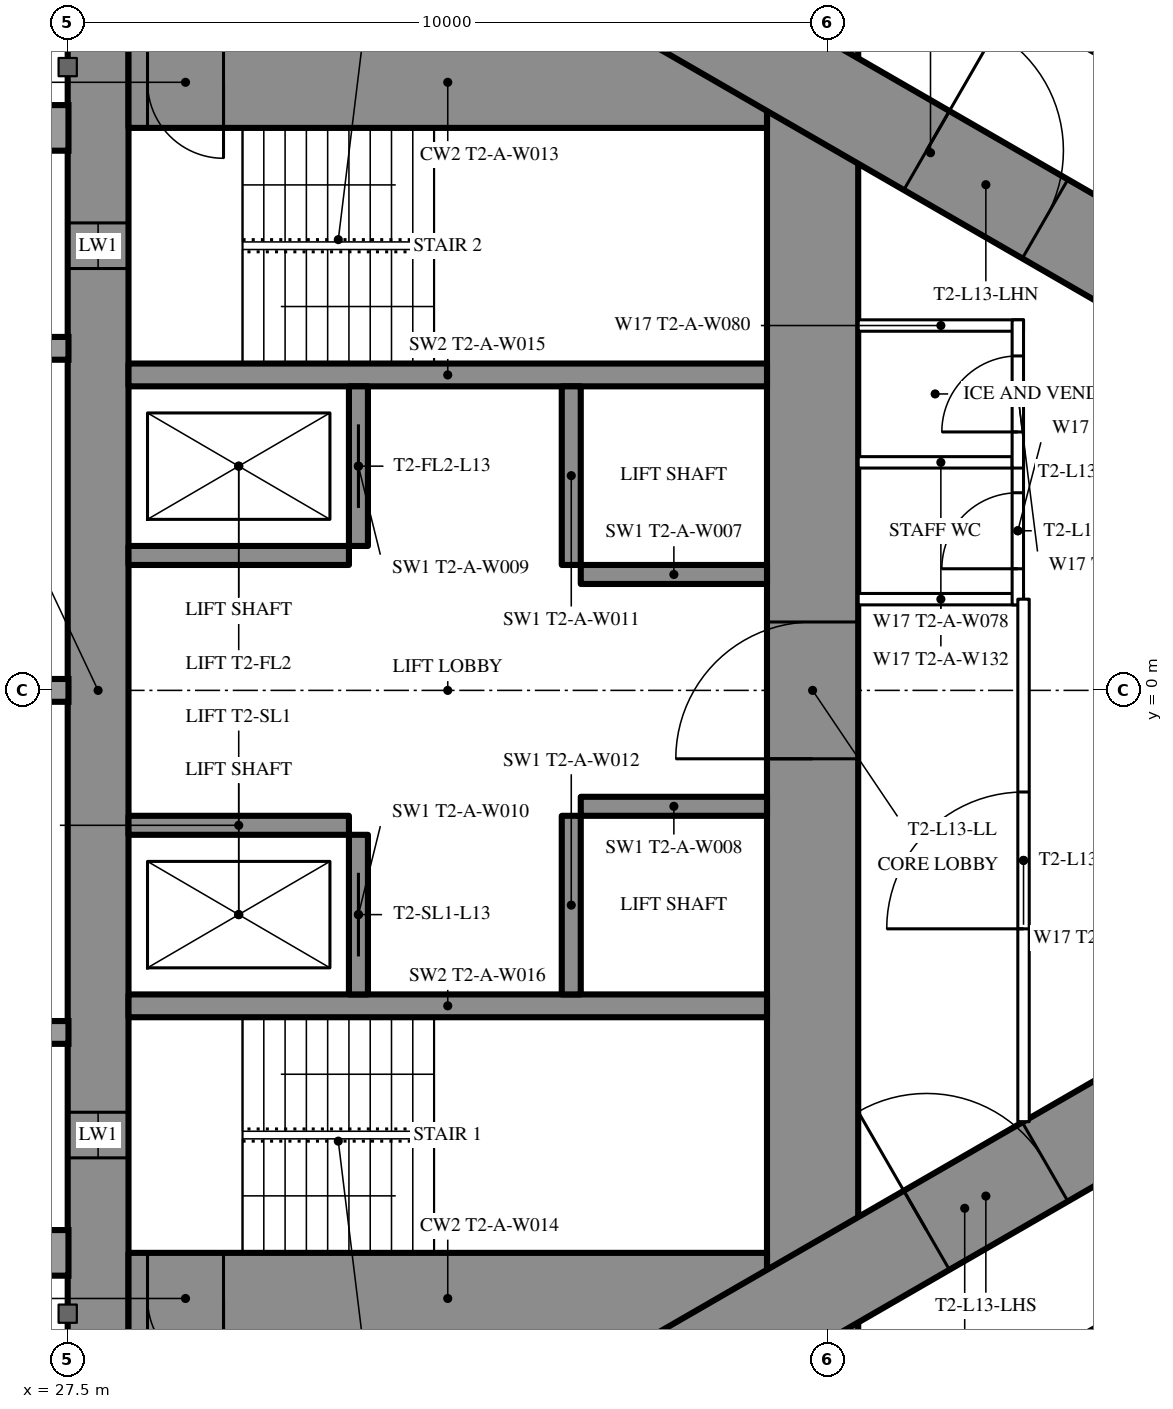
"""IFC4 building model, lengths in metres.
Left out: names, types, materials, properties, quantities, classifications, styles, units other than length and angle.
Written with IfcOpenShell. Run it as: python <this file> out.ifc"""

import sys

from ifc_helpers import new_model, si_unit, direction, frame, frame_2d, origin, place, context, subcontext, project, spatial, rectangle, extrude, element, fill, save


model = new_model("IFC4")
c1 = context("Model", 3, precision=1e-05, world=origin(), true_north=direction((0.0, 1.0)))
c2 = subcontext(c1, "Body", "Model", "MODEL_VIEW")
j1 = project(units=[si_unit("LENGTHUNIT", "METRE"), si_unit("PLANEANGLEUNIT", "RADIAN")], contexts=[c1])
p1 = place(None, origin())
s1 = spatial("IfcSite", under=j1, at=p1, CompositionType="ELEMENT")
p2 = place(p1, origin())
s2 = spatial("IfcBuilding", under=s1, at=p2, CompositionType="ELEMENT")
p3 = place(p2, frame((0.0, 0.0, 53.0)))
s3 = spatial("IfcBuildingStorey", under=s2, at=p3, CompositionType="ELEMENT", Elevation=53.0)
p4 = place(p3, frame((27.9, -8.6, 0.0), z_axis=(0.0, 0.0, 1.0), x_axis=(0.0, 1.0, 0.0)))
e1 = element("IfcWall", 1, at=p4, inside=s3, PredefinedType="SHEAR", context=c2, shape_type="SweptSolid", body=[
    extrude(rectangle(XDim=17.2, YDim=0.8, at=frame_2d((8.6, 0.0))), origin(), (0.0, 0.0, 1.0), 3.5),
])
p5 = place(p4, frame((2.45, 0.0, 0.6)))
e2 = element("IfcOpeningElement", 2, at=p5, cuts=e1, PredefinedType="OPENING", context=c2, shape_type="SweptSolid", body=[
    extrude(rectangle(XDim=0.6, YDim=2.1, at=frame_2d((0.3, 1.05))), frame((0.0, 0.41, 0.0), z_axis=(0.0, -1.0, 0.0), x_axis=(1.0, 0.0, 0.0)), (0.0, 0.0, 1.0), 0.82),
])
p6 = place(p4, frame((14.15, 0.0, 0.6)))
e3 = element("IfcOpeningElement", 3, at=p6, cuts=e1, PredefinedType="OPENING", context=c2, shape_type="SweptSolid", body=[
    extrude(rectangle(XDim=0.6, YDim=2.1, at=frame_2d((0.3, 1.05))), frame((0.0, 0.41, 0.0), z_axis=(0.0, -1.0, 0.0), x_axis=(1.0, 0.0, 0.0)), (0.0, 0.0, 1.0), 0.82),
])
p7 = place(p3, frame((37.3, -8.6, 0.0), z_axis=(0.0, 0.0, 1.0), x_axis=(0.0, 1.0, 0.0)))
e4 = element("IfcWall", 4, at=p7, inside=s3, PredefinedType="SHEAR", context=c2, shape_type="SweptSolid", body=[
    extrude(rectangle(XDim=17.2, YDim=1.2, at=frame_2d((8.6, 0.0))), origin(), (0.0, 0.0, 1.0), 3.5),
])
p8 = place(p7, frame((7.7, 0.0, 0.0)))
e5 = element("IfcOpeningElement", 5, at=p8, cuts=e4, PredefinedType="OPENING", context=c2, shape_type="SweptSolid", body=[
    extrude(rectangle(XDim=1.8, YDim=2.2, at=frame_2d((0.9, 1.1))), frame((0.0, 0.61, 0.0), z_axis=(0.0, -1.0, 0.0), x_axis=(1.0, 0.0, 0.0)), (0.0, 0.0, 1.0), 1.22),
])
p9 = place(p3, frame((28.3, -8.0, 0.0), z_axis=(0.0, 0.0, 1.0), x_axis=(1.0, 0.0, 0.0)))
e6 = element("IfcWall", 6, at=p9, inside=s3, PredefinedType="SHEAR", context=c2, shape_type="SweptSolid", body=[
    extrude(rectangle(XDim=8.4, YDim=1.2, at=frame_2d((4.2, 0.0))), origin(), (0.0, 0.0, 1.0), 3.5),
])
p10 = place(p9, frame((0.25, 0.0, 0.0)))
e7 = element("IfcOpeningElement", 7, at=p10, cuts=e6, PredefinedType="OPENING", context=c2, shape_type="SweptSolid", body=[
    extrude(rectangle(XDim=1.0, YDim=2.2, at=frame_2d((0.5, 1.1))), frame((0.0, 0.61, 0.0), z_axis=(0.0, -1.0, 0.0), x_axis=(1.0, 0.0, 0.0)), (0.0, 0.0, 1.0), 1.22),
])
p11 = place(p3, frame((28.3, 8.0, 0.0), z_axis=(0.0, 0.0, 1.0), x_axis=(1.0, 0.0, 0.0)))
e8 = element("IfcWall", 8, at=p11, inside=s3, PredefinedType="SHEAR", context=c2, shape_type="SweptSolid", body=[
    extrude(rectangle(XDim=8.4, YDim=1.2, at=frame_2d((4.2, 0.0))), origin(), (0.0, 0.0, 1.0), 3.5),
])
p12 = place(p11, frame((0.25, 0.0, 0.0)))
e9 = element("IfcOpeningElement", 9, at=p12, cuts=e8, PredefinedType="OPENING", context=c2, shape_type="SweptSolid", body=[
    extrude(rectangle(XDim=1.0, YDim=2.2, at=frame_2d((0.5, 1.1))), frame((0.0, 0.61, 0.0), z_axis=(0.0, -1.0, 0.0), x_axis=(1.0, 0.0, 0.0)), (0.0, 0.0, 1.0), 1.22),
])
for number, where, z_axis, x_axis in (
    (10, (28.3, -4.15, 0.0), (0.0, 0.0, 1.0), (1.0, 0.0, 0.0)),
    (11, (28.3, 4.15, 0.0), (0.0, 0.0, 1.0), (1.0, 0.0, 0.0)),
):
    element("IfcWall", number, at=place(p3, frame(where, z_axis=z_axis, x_axis=x_axis)), inside=s3, PredefinedType="SHEAR", context=c2, shape_type="SweptSolid", body=[
        extrude(rectangle(XDim=8.4, YDim=0.3, at=frame_2d((4.2, 0.0))), origin(), (0.0, 0.0, 1.0), 3.5),
    ])
p13 = place(p3, frame((31.325, -4.0, 0.0), z_axis=(0.0, 0.0, 1.0), x_axis=(0.0, 1.0, 0.0)))
e12 = element("IfcWall", 12, at=p13, inside=s3, PredefinedType="SHEAR", context=c2, shape_type="SweptSolid", body=[
    extrude(rectangle(XDim=2.1, YDim=0.25, at=frame_2d((1.05, 0.0))), origin(), (0.0, 0.0, 1.0), 3.5),
])
p14 = place(p13, frame((0.5, 0.0, 0.0)))
e13 = element("IfcOpeningElement", 13, at=p14, cuts=e12, PredefinedType="OPENING", context=c2, shape_type="SweptSolid", body=[
    extrude(rectangle(XDim=1.1, YDim=2.2, at=frame_2d((0.55, 1.1))), frame((0.0, 0.135, 0.0), z_axis=(0.0, -1.0, 0.0), x_axis=(1.0, 0.0, 0.0)), (0.0, 0.0, 1.0), 0.27),
])
p15 = place(p3, frame((34.125, -4.0, 0.0), z_axis=(0.0, 0.0, 1.0), x_axis=(0.0, 1.0, 0.0)))
e14 = element("IfcWall", 14, at=p15, inside=s3, PredefinedType="SHEAR", context=c2, shape_type="SweptSolid", body=[
    extrude(rectangle(XDim=2.35, YDim=0.25, at=frame_2d((1.175, 0.0))), origin(), (0.0, 0.0, 1.0), 3.5),
])
p16 = place(p3, frame((28.3, -1.775, 0.0), z_axis=(0.0, 0.0, 1.0), x_axis=(1.0, 0.0, 0.0)))
e15 = element("IfcWall", 15, at=p16, inside=s3, PredefinedType="SHEAR", context=c2, shape_type="SweptSolid", body=[
    extrude(rectangle(XDim=2.9, YDim=0.25, at=frame_2d((1.45, 0.0))), origin(), (0.0, 0.0, 1.0), 3.5),
])
p17 = place(p3, frame((34.25, -1.525, 0.0), z_axis=(0.0, 0.0, 1.0), x_axis=(1.0, 0.0, 0.0)))
e16 = element("IfcWall", 16, at=p17, inside=s3, PredefinedType="SHEAR", context=c2, shape_type="SweptSolid", body=[
    extrude(rectangle(XDim=2.45, YDim=0.25, at=frame_2d((1.225, 0.0))), origin(), (0.0, 0.0, 1.0), 3.5),
])
p18 = place(p3, frame((31.325, 1.9, 0.0), z_axis=(0.0, 0.0, 1.0), x_axis=(0.0, 1.0, 0.0)))
e17 = element("IfcWall", 17, at=p18, inside=s3, PredefinedType="SHEAR", context=c2, shape_type="SweptSolid", body=[
    extrude(rectangle(XDim=2.1, YDim=0.25, at=frame_2d((1.05, 0.0))), origin(), (0.0, 0.0, 1.0), 3.5),
])
p19 = place(p18, frame((0.5, 0.0, 0.0)))
e18 = element("IfcOpeningElement", 18, at=p19, cuts=e17, PredefinedType="OPENING", context=c2, shape_type="SweptSolid", body=[
    extrude(rectangle(XDim=1.1, YDim=2.2, at=frame_2d((0.55, 1.1))), frame((0.0, 0.135, 0.0), z_axis=(0.0, -1.0, 0.0), x_axis=(1.0, 0.0, 0.0)), (0.0, 0.0, 1.0), 0.27),
])
p20 = place(p3, frame((34.125, 1.65, 0.0), z_axis=(0.0, 0.0, 1.0), x_axis=(0.0, 1.0, 0.0)))
e19 = element("IfcWall", 19, at=p20, inside=s3, PredefinedType="SHEAR", context=c2, shape_type="SweptSolid", body=[
    extrude(rectangle(XDim=2.35, YDim=0.25, at=frame_2d((1.175, 0.0))), origin(), (0.0, 0.0, 1.0), 3.5),
])
p21 = place(p3, frame((28.3, 1.775, 0.0), z_axis=(0.0, 0.0, 1.0), x_axis=(1.0, 0.0, 0.0)))
e20 = element("IfcWall", 20, at=p21, inside=s3, PredefinedType="SHEAR", context=c2, shape_type="SweptSolid", body=[
    extrude(rectangle(XDim=2.9, YDim=0.25, at=frame_2d((1.45, 0.0))), origin(), (0.0, 0.0, 1.0), 3.5),
])
p22 = place(p3, frame((34.25, 1.525, 0.0), z_axis=(0.0, 0.0, 1.0), x_axis=(1.0, 0.0, 0.0)))
e21 = element("IfcWall", 21, at=p22, inside=s3, PredefinedType="SHEAR", context=c2, shape_type="SweptSolid", body=[
    extrude(rectangle(XDim=2.45, YDim=0.25, at=frame_2d((1.225, 0.0))), origin(), (0.0, 0.0, 1.0), 3.5),
])
p23 = place(p3, frame((27.2, -13.8, 0.0), z_axis=(0.0, 0.0, 1.0), x_axis=(0.866027159892, 0.499996958321, 0.0)))
e22 = element("IfcWall", 22, at=p23, inside=s3, PredefinedType="SHEAR", context=c2, shape_type="SweptSolid", body=[
    extrude(rectangle(XDim=27.947, YDim=1.2, at=frame_2d((13.973, 0.0))), origin(), (0.0, 0.0, 1.0), 3.5),
])
p24 = place(p23, frame((4.6, 0.0, 0.0)))
e23 = element("IfcOpeningElement", 23, at=p24, cuts=e22, PredefinedType="OPENING", context=c2, shape_type="SweptSolid", body=[
    extrude(rectangle(XDim=1.0, YDim=2.2, at=frame_2d((0.5, 1.1))), frame((0.0, 0.61, 0.0), z_axis=(0.0, -1.0, 0.0), x_axis=(1.0, 0.0, 0.0)), (0.0, 0.0, 1.0), 1.22),
])
p25 = place(p23, frame((13.395, 0.0, 0.0)))
e24 = element("IfcOpeningElement", 24, at=p25, cuts=e22, PredefinedType="OPENING", context=c2, shape_type="SweptSolid", body=[
    extrude(rectangle(XDim=1.8, YDim=2.2, at=frame_2d((0.9, 1.1))), frame((0.0, 0.61, 0.0), z_axis=(0.0, -1.0, 0.0), x_axis=(1.0, 0.0, 0.0)), (0.0, 0.0, 1.0), 1.22),
])
p26 = place(p3, frame((27.2, 13.8, 0.0), z_axis=(0.0, 0.0, 1.0), x_axis=(0.866024515034, -0.500001539357, 0.0)))
e25 = element("IfcWall", 25, at=p26, inside=s3, PredefinedType="SHEAR", context=c2, shape_type="SweptSolid", body=[
    extrude(rectangle(XDim=26.907, YDim=1.2, at=frame_2d((13.454, 0.0))), origin(), (0.0, 0.0, 1.0), 3.5),
])
p27 = place(p26, frame((4.6, 0.0, 0.0)))
e26 = element("IfcOpeningElement", 26, at=p27, cuts=e25, PredefinedType="OPENING", context=c2, shape_type="SweptSolid", body=[
    extrude(rectangle(XDim=1.0, YDim=2.2, at=frame_2d((0.5, 1.1))), frame((0.0, 0.61, 0.0), z_axis=(0.0, -1.0, 0.0), x_axis=(1.0, 0.0, 0.0)), (0.0, 0.0, 1.0), 1.22),
])
p28 = place(p26, frame((13.395, 0.0, 0.0)))
e27 = element("IfcOpeningElement", 27, at=p28, cuts=e25, PredefinedType="OPENING", context=c2, shape_type="SweptSolid", body=[
    extrude(rectangle(XDim=1.8, YDim=2.2, at=frame_2d((0.9, 1.1))), frame((0.0, 0.61, 0.0), z_axis=(0.0, -1.0, 0.0), x_axis=(1.0, 0.0, 0.0)), (0.0, 0.0, 1.0), 1.22),
])
p29 = place(p3, frame((37.96, -10.243, 0.0), z_axis=(0.0, 0.0, 1.0), x_axis=(0.866026429433, 0.499998223521, 0.0)))
e28 = element("IfcWall", 28, at=p29, inside=s3, PredefinedType="PARTITIONING", context=c2, shape_type="SweptSolid", body=[
    extrude(rectangle(XDim=20.487, YDim=0.2, at=frame_2d((10.243, 0.0))), origin(), (0.0, 0.0, 1.0), 3.25),
])
p30 = place(p29, frame((6.925, 0.0, 0.0)))
e29 = element("IfcOpeningElement", 29, at=p30, cuts=e28, PredefinedType="OPENING", context=c2, shape_type="SweptSolid", body=[
    extrude(rectangle(XDim=0.95, YDim=2.2, at=frame_2d((0.475, 1.1))), frame((0.0, 0.11, 0.0), z_axis=(0.0, -1.0, 0.0), x_axis=(1.0, 0.0, 0.0)), (0.0, 0.0, 1.0), 0.22),
])
p31 = place(p29, frame((11.549, 0.0, 0.0)))
e30 = element("IfcOpeningElement", 30, at=p31, cuts=e28, PredefinedType="OPENING", context=c2, shape_type="SweptSolid", body=[
    extrude(rectangle(XDim=0.95, YDim=2.2, at=frame_2d((0.475, 1.1))), frame((0.0, 0.11, 0.0), z_axis=(0.0, -1.0, 0.0), x_axis=(1.0, 0.0, 0.0)), (0.0, 0.0, 1.0), 0.22),
])
p32 = place(p29, frame((13.249, 0.0, 0.0)))
e31 = element("IfcOpeningElement", 31, at=p32, cuts=e28, PredefinedType="OPENING", context=c2, shape_type="SweptSolid", body=[
    extrude(rectangle(XDim=0.95, YDim=2.2, at=frame_2d((0.475, 1.1))), frame((0.0, 0.11, 0.0), z_axis=(0.0, -1.0, 0.0), x_axis=(1.0, 0.0, 0.0)), (0.0, 0.0, 1.0), 0.22),
])
p33 = place(p29, frame((17.585, 0.0, 0.0)))
e32 = element("IfcOpeningElement", 32, at=p33, cuts=e28, PredefinedType="OPENING", context=c2, shape_type="SweptSolid", body=[
    extrude(rectangle(XDim=0.95, YDim=2.2, at=frame_2d((0.475, 1.1))), frame((0.0, 0.11, 0.0), z_axis=(0.0, -1.0, 0.0), x_axis=(1.0, 0.0, 0.0)), (0.0, 0.0, 1.0), 0.22),
])
p34 = place(p29, frame((0.6, 0.0, 0.0)))
e33 = element("IfcOpeningElement", 33, at=p34, cuts=e28, PredefinedType="OPENING", context=c2, shape_type="SweptSolid", body=[
    extrude(rectangle(XDim=0.95, YDim=2.2, at=frame_2d((0.475, 1.1))), frame((0.0, 0.11, 0.0), z_axis=(0.0, -1.0, 0.0), x_axis=(1.0, 0.0, 0.0)), (0.0, 0.0, 1.0), 0.22),
])
p35 = place(p3, frame((36.834, 10.894, 0.0), z_axis=(0.0, 0.0, 1.0), x_axis=(0.866031136856, -0.499990069898, 0.0)))
e34 = element("IfcWall", 34, at=p35, inside=s3, PredefinedType="PARTITIONING", context=c2, shape_type="SweptSolid", body=[
    extrude(rectangle(XDim=5.475, YDim=0.2, at=frame_2d((2.738, 0.0))), origin(), (0.0, 0.0, 1.0), 3.25),
])
p36 = place(p35, frame((1.542, 0.0, 0.0)))
e35 = element("IfcOpeningElement", 35, at=p36, cuts=e34, PredefinedType="OPENING", context=c2, shape_type="SweptSolid", body=[
    extrude(rectangle(XDim=0.95, YDim=2.2, at=frame_2d((0.475, 1.1))), frame((0.0, 0.11, 0.0), z_axis=(0.0, -1.0, 0.0), x_axis=(1.0, 0.0, 0.0)), (0.0, 0.0, 1.0), 0.22),
])
p37 = place(p35, frame((0.246, 0.0, 0.0)))
e36 = element("IfcOpeningElement", 36, at=p37, cuts=e34, PredefinedType="OPENING", context=c2, shape_type="SweptSolid", body=[
    extrude(rectangle(XDim=0.9, YDim=2.2, at=frame_2d((0.45, 1.1))), frame((0.0, 0.11, 0.0), z_axis=(0.0, -1.0, 0.0), x_axis=(1.0, 0.0, 0.0)), (0.0, 0.0, 1.0), 0.22),
])
for number, where, z_axis, x_axis in (
    (37, (37.9, 1.2, 0.0), (0.0, 0.0, 1.0), (1.0, 0.0, 0.0)),
    (38, (37.9, 3.0, 0.0), (0.0, 0.0, 1.0), (1.0, 0.0, 0.0)),
    (39, (37.9, 4.8, 0.0), (0.0, 0.0, 1.0), (1.0, 0.0, 0.0)),
):
    element("IfcWall", number, at=place(p3, frame(where, z_axis=z_axis, x_axis=x_axis)), inside=s3, PredefinedType="PARTITIONING", context=c2, shape_type="SweptSolid", body=[
        extrude(rectangle(XDim=2.175, YDim=0.15, at=frame_2d((1.087, 0.0))), origin(), (0.0, 0.0, 1.0), 3.25),
    ])
p38 = place(p3, frame((40.0, 1.125, 0.0), z_axis=(0.0, 0.0, 1.0), x_axis=(0.0, 1.0, 0.0)))
e40 = element("IfcWall", 40, at=p38, inside=s3, PredefinedType="PARTITIONING", context=c2, shape_type="SweptSolid", body=[
    extrude(rectangle(XDim=1.95, YDim=0.15, at=frame_2d((0.975, 0.0))), origin(), (0.0, 0.0, 1.0), 3.25),
])
p39 = place(p38, frame((0.475, 0.0, 0.0)))
e41 = element("IfcOpeningElement", 41, at=p39, cuts=e40, PredefinedType="OPENING", context=c2, shape_type="SweptSolid", body=[
    extrude(rectangle(XDim=1.0, YDim=2.2, at=frame_2d((0.5, 1.1))), frame((0.0, 0.085, 0.0), z_axis=(0.0, -1.0, 0.0), x_axis=(1.0, 0.0, 0.0)), (0.0, 0.0, 1.0), 0.17),
])
p40 = place(p3, frame((40.0, 2.925, 0.0), z_axis=(0.0, 0.0, 1.0), x_axis=(0.0, 1.0, 0.0)))
e42 = element("IfcWall", 42, at=p40, inside=s3, PredefinedType="PARTITIONING", context=c2, shape_type="SweptSolid", body=[
    extrude(rectangle(XDim=1.95, YDim=0.15, at=frame_2d((0.975, 0.0))), origin(), (0.0, 0.0, 1.0), 3.25),
])
p41 = place(p40, frame((0.475, 0.0, 0.0)))
e43 = element("IfcOpeningElement", 43, at=p41, cuts=e42, PredefinedType="OPENING", context=c2, shape_type="SweptSolid", body=[
    extrude(rectangle(XDim=1.0, YDim=2.2, at=frame_2d((0.5, 1.1))), frame((0.0, 0.085, 0.0), z_axis=(0.0, -1.0, 0.0), x_axis=(1.0, 0.0, 0.0)), (0.0, 0.0, 1.0), 0.17),
])
p42 = place(p3, frame((40.075, -5.674, 0.0), z_axis=(0.0, 0.0, 1.0), x_axis=(0.0, 1.0, 0.0)))
e44 = element("IfcWall", 44, at=p42, inside=s3, PredefinedType="PARTITIONING", context=c2, shape_type="SweptSolid", body=[
    extrude(rectangle(XDim=6.874, YDim=0.15, at=frame_2d((3.437, 0.0))), origin(), (0.0, 0.0, 1.0), 3.25),
])
p43 = place(p42, frame((2.537, 0.0, 0.0)))
e45 = element("IfcOpeningElement", 45, at=p43, cuts=e44, PredefinedType="OPENING", context=c2, shape_type="SweptSolid", body=[
    extrude(rectangle(XDim=1.8, YDim=2.2, at=frame_2d((0.9, 1.1))), frame((0.0, 0.085, 0.0), z_axis=(0.0, -1.0, 0.0), x_axis=(1.0, 0.0, 0.0)), (0.0, 0.0, 1.0), 0.17),
])
p44 = place(p39, origin())
e46 = element("IfcDoor", 46, at=p44, inside=s3, OperationType="SINGLE_SWING_LEFT", PredefinedType="DOOR", context=c2, shape_type="SweptSolid", body=[
    extrude(rectangle(XDim=1.0, YDim=2.2, at=frame_2d((0.5, 1.1))), frame((0.0, 0.025, 0.0), z_axis=(0.0, -1.0, 0.0), x_axis=(1.0, 0.0, 0.0)), (0.0, 0.0, 1.0), 0.05),
])
fill(e41, e46)
p45 = place(p41, origin())
e47 = element("IfcDoor", 47, at=p45, inside=s3, OperationType="SINGLE_SWING_LEFT", PredefinedType="DOOR", context=c2, shape_type="SweptSolid", body=[
    extrude(rectangle(XDim=1.0, YDim=2.2, at=frame_2d((0.5, 1.1))), frame((0.0, 0.025, 0.0), z_axis=(0.0, -1.0, 0.0), x_axis=(1.0, 0.0, 0.0)), (0.0, 0.0, 1.0), 0.05),
])
fill(e43, e47)
p46 = place(p43, origin())
e48 = element("IfcDoor", 48, at=p46, inside=s3, OperationType="DOUBLE_DOOR_SINGLE_SWING", PredefinedType="DOOR", context=c2, shape_type="SweptSolid", body=[
    extrude(rectangle(XDim=1.8, YDim=2.2, at=frame_2d((0.9, 1.1))), frame((0.0, 0.025, 0.0), z_axis=(0.0, -1.0, 0.0), x_axis=(1.0, 0.0, 0.0)), (0.0, 0.0, 1.0), 0.05),
])
fill(e45, e48)
p47 = place(p25, origin())
e49 = element("IfcDoor", 49, at=p47, inside=s3, OperationType="DOUBLE_DOOR_SINGLE_SWING", PredefinedType="DOOR", context=c2, shape_type="SweptSolid", body=[
    extrude(rectangle(XDim=1.8, YDim=2.2, at=frame_2d((0.9, 1.1))), frame((0.0, 0.025, 0.0), z_axis=(0.0, -1.0, 0.0), x_axis=(1.0, 0.0, 0.0)), (0.0, 0.0, 1.0), 0.05),
])
fill(e24, e49)
p48 = place(p28, origin())
e50 = element("IfcDoor", 50, at=p48, inside=s3, OperationType="DOUBLE_DOOR_SINGLE_SWING", PredefinedType="DOOR", context=c2, shape_type="SweptSolid", body=[
    extrude(rectangle(XDim=1.8, YDim=2.2, at=frame_2d((0.9, 1.1))), frame((0.0, 0.025, 0.0), z_axis=(0.0, -1.0, 0.0), x_axis=(1.0, 0.0, 0.0)), (0.0, 0.0, 1.0), 0.05),
])
fill(e27, e50)
p49 = place(p8, origin())
e51 = element("IfcDoor", 51, at=p49, inside=s3, OperationType="DOUBLE_DOOR_SINGLE_SWING", PredefinedType="DOOR", context=c2, shape_type="SweptSolid", body=[
    extrude(rectangle(XDim=1.8, YDim=2.2, at=frame_2d((0.9, 1.1))), frame((0.0, 0.025, 0.0), z_axis=(0.0, -1.0, 0.0), x_axis=(1.0, 0.0, 0.0)), (0.0, 0.0, 1.0), 0.05),
])
fill(e5, e51)
p50 = place(p10, origin())
e52 = element("IfcDoor", 52, at=p50, inside=s3, OperationType="SINGLE_SWING_RIGHT", PredefinedType="DOOR", context=c2, shape_type="SweptSolid", body=[
    extrude(rectangle(XDim=1.0, YDim=2.2, at=frame_2d((0.5, 1.1))), frame((0.0, 0.025, 0.0), z_axis=(0.0, -1.0, 0.0), x_axis=(1.0, 0.0, 0.0)), (0.0, 0.0, 1.0), 0.05),
])
fill(e7, e52)
p51 = place(p12, origin())
e53 = element("IfcDoor", 53, at=p51, inside=s3, OperationType="SINGLE_SWING_RIGHT", PredefinedType="DOOR", context=c2, shape_type="SweptSolid", body=[
    extrude(rectangle(XDim=1.0, YDim=2.2, at=frame_2d((0.5, 1.1))), frame((0.0, 0.025, 0.0), z_axis=(0.0, -1.0, 0.0), x_axis=(1.0, 0.0, 0.0)), (0.0, 0.0, 1.0), 0.05),
])
fill(e9, e53)
p52 = place(p14, origin())
e54 = element("IfcDoor", 54, at=p52, inside=s3, OperationType="SLIDING_TO_LEFT", PredefinedType="USERDEFINED", context=c2, shape_type="SweptSolid", body=[
    extrude(rectangle(XDim=1.1, YDim=2.2, at=frame_2d((0.55, 1.1))), frame((0.0, 0.025, 0.0), z_axis=(0.0, -1.0, 0.0), x_axis=(1.0, 0.0, 0.0)), (0.0, 0.0, 1.0), 0.05),
])
fill(e13, e54)
p53 = place(p19, origin())
e55 = element("IfcDoor", 55, at=p53, inside=s3, OperationType="SLIDING_TO_LEFT", PredefinedType="USERDEFINED", context=c2, shape_type="SweptSolid", body=[
    extrude(rectangle(XDim=1.1, YDim=2.2, at=frame_2d((0.55, 1.1))), frame((0.0, 0.025, 0.0), z_axis=(0.0, -1.0, 0.0), x_axis=(1.0, 0.0, 0.0)), (0.0, 0.0, 1.0), 0.05),
])
fill(e18, e55)
p54 = place(p5, origin())
e56 = element("IfcWindow", 56, at=p54, inside=s3, PartitioningType="SINGLE_PANEL", PredefinedType="WINDOW", context=c2, shape_type="SweptSolid", body=[
    extrude(rectangle(XDim=0.6, YDim=2.1, at=frame_2d((0.3, 1.05))), frame((0.0, 0.03, 0.0), z_axis=(0.0, -1.0, 0.0), x_axis=(1.0, 0.0, 0.0)), (0.0, 0.0, 1.0), 0.06),
])
fill(e2, e56)
p55 = place(p6, origin())
e57 = element("IfcWindow", 57, at=p55, inside=s3, PartitioningType="SINGLE_PANEL", PredefinedType="WINDOW", context=c2, shape_type="SweptSolid", body=[
    extrude(rectangle(XDim=0.6, YDim=2.1, at=frame_2d((0.3, 1.05))), frame((0.0, 0.03, 0.0), z_axis=(0.0, -1.0, 0.0), x_axis=(1.0, 0.0, 0.0)), (0.0, 0.0, 1.0), 0.06),
])
fill(e3, e57)
save(model, sys.argv[1])
